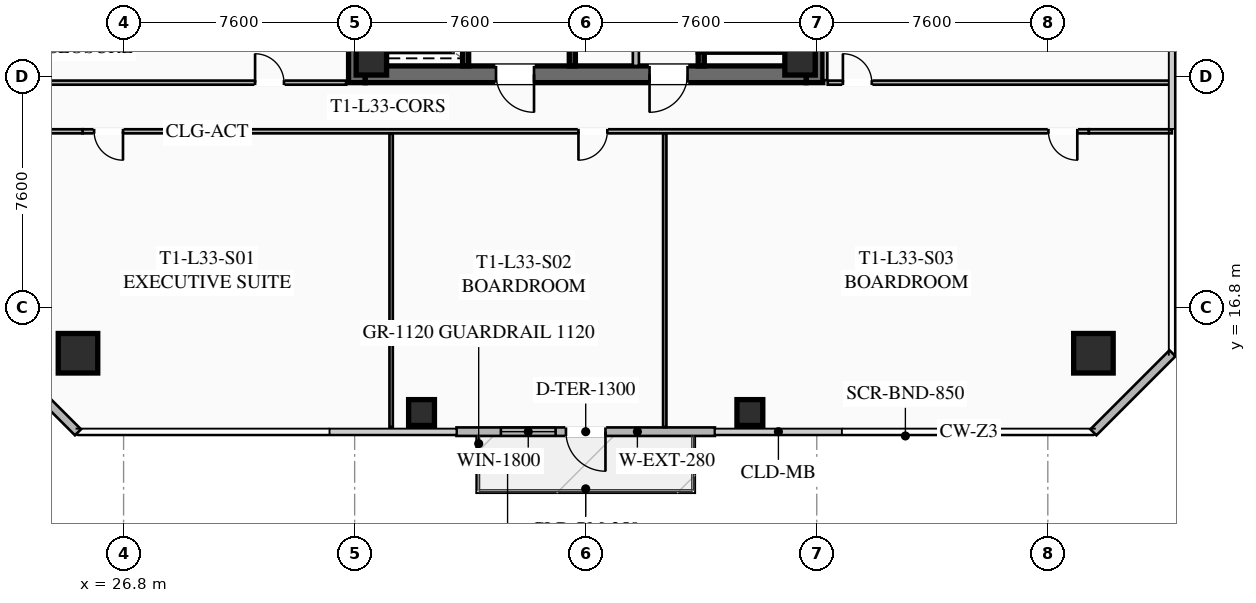
"""IFC4 building model, lengths in metres.
Left out: names, types, materials, properties, quantities, classifications, styles, units other than length and angle.
Written with IfcOpenShell. Run it as: python <this file> out.ifc"""

import sys

from ifc_helpers import new_model, si_unit, direction, frame, frame_2d, origin, origin_2d, place, context, subcontext, project, spatial, rectangle, hollow_rectangle, extrude, element, fill, save


model = new_model("IFC4")
c1 = context("Model", 3, precision=1e-05, world=origin(), true_north=direction((0.0, 1.0)))
c2 = subcontext(c1, "Body", "Model", "MODEL_VIEW")
j1 = project(units=[si_unit("LENGTHUNIT", "METRE"), si_unit("PLANEANGLEUNIT", "RADIAN")], contexts=[c1])
p1 = place(None, origin())
s1 = spatial("IfcSite", under=j1, at=p1, CompositionType="ELEMENT")
p2 = place(p1, origin())
s2 = spatial("IfcBuilding", under=s1, at=p2, CompositionType="ELEMENT")
p3 = place(p2, frame((0.0, 0.0, 125.05)))
s3 = spatial("IfcBuildingStorey", under=s2, at=p3, CompositionType="ELEMENT", Elevation=125.05)
for number, where, z_axis, x_axis in (
    (1, (34.475, 24.2, 0.0), (0.0, 0.0, 1.0), (0.0, 1.0, 0.0)),
    (2, (49.525, 39.8, 0.0), (0.0, 0.0, 1.0), (0.0, -1.0, 0.0)),
):
    element("IfcWall", number, at=place(p3, frame(where, z_axis=z_axis, x_axis=x_axis)), inside=s3, PredefinedType="SHEAR", context=c2, shape_type="SweptSolid", body=[
        extrude(rectangle(XDim=15.6, YDim=0.55, at=frame_2d((7.8, 0.0))), origin(), (0.0, 0.0, 1.0), 3.55),
    ])
p4 = place(p3, frame((49.25, 24.475, 0.0), z_axis=(0.0, 0.0, 1.0), x_axis=(-1.0, 0.0, 0.0)))
e3 = element("IfcWall", 3, at=p4, inside=s3, PredefinedType="SHEAR", context=c2, shape_type="SweptSolid", body=[
    extrude(rectangle(XDim=14.5, YDim=0.55, at=frame_2d((7.25, 0.0))), origin(), (0.0, 0.0, 1.0), 3.55),
])
p5 = place(p4, frame((8.95, 0.0, 0.0)))
e4 = element("IfcOpeningElement", 4, at=p5, cuts=e3, PredefinedType="OPENING", context=c2, shape_type="SweptSolid", body=[
    extrude(rectangle(XDim=1.25, YDim=2.25, at=frame_2d((0.625, 1.125))), frame((0.0, 0.285, 0.0), z_axis=(0.0, -1.0, 0.0), x_axis=(1.0, 0.0, 0.0)), (0.0, 0.0, 1.0), 0.57),
])
p6 = place(p4, frame((3.9, 0.0, 0.0)))
e5 = element("IfcOpeningElement", 5, at=p6, cuts=e3, PredefinedType="OPENING", context=c2, shape_type="SweptSolid", body=[
    extrude(rectangle(XDim=1.25, YDim=2.25, at=frame_2d((0.625, 1.125))), frame((0.0, 0.285, 0.0), z_axis=(0.0, -1.0, 0.0), x_axis=(1.0, 0.0, 0.0)), (0.0, 0.0, 1.0), 0.57),
])
for number, where, z_axis, x_axis in (
    (6, (34.95, 24.95, 0.0), (0.0, 0.0, 1.0), (1.0, 0.0, 0.0)),
    (7, (49.05, 24.95, 0.0), (0.0, 0.0, 1.0), (1.0, 0.0, 0.0)),
):
    element("IfcColumn", number, at=place(p3, frame(where, z_axis=z_axis, x_axis=x_axis)), inside=s3, PredefinedType="COLUMN", context=c2, shape_type="SweptSolid", body=[
        extrude(hollow_rectangle(XDim=1.0, YDim=1.0, WallThickness=0.04, at=origin_2d()), origin(), (0.0, 0.0, 1.0), 3.37),
    ])
for number, where, z_axis, x_axis in (
    (8, (25.3, 15.3, 0.0), (0.0, 0.0, 1.0), (1.0, 0.0, 0.0)),
    (9, (58.7, 15.3, 0.0), (0.0, 0.0, 1.0), (1.0, 0.0, 0.0)),
):
    element("IfcColumn", number, at=place(p3, frame(where, z_axis=z_axis, x_axis=x_axis)), inside=s3, PredefinedType="COLUMN", context=c2, shape_type="SweptSolid", body=[
        extrude(hollow_rectangle(XDim=1.3, YDim=1.3, WallThickness=0.05, at=origin_2d()), origin(), (0.0, 0.0, 1.0), 3.37),
    ])
for number, where, z_axis, x_axis in (
    (10, (36.6, 13.35, 0.0), (0.0, 0.0, 1.0), (1.0, 0.0, 0.0)),
    (11, (47.4, 13.35, 0.0), (0.0, 0.0, 1.0), (1.0, 0.0, 0.0)),
):
    element("IfcColumn", number, at=place(p3, frame(where, z_axis=z_axis, x_axis=x_axis)), inside=s3, PredefinedType="COLUMN", context=c2, shape_type="SweptSolid", body=[
        extrude(hollow_rectangle(XDim=0.85, YDim=0.85, WallThickness=0.035, at=origin_2d()), origin(), (0.0, 0.0, 1.0), 3.37),
    ])
p7 = place(p3, frame((46.25, 12.72, 0.0), z_axis=(0.0, 0.0, 1.0), x_axis=(-1.0, 0.0, 0.0)))
e12 = element("IfcWall", 12, at=p7, inside=s3, PredefinedType="SOLIDWALL", context=c2, shape_type="SweptSolid", body=[
    extrude(rectangle(XDim=8.5, YDim=0.28, at=frame_2d((4.25, 0.0))), origin(), (0.0, 0.0, 1.0), 3.37),
])
p8 = place(p7, frame((3.6, 0.0, 0.0)))
e13 = element("IfcOpeningElement", 13, at=p8, cuts=e12, PredefinedType="OPENING", context=c2, shape_type="SweptSolid", body=[
    extrude(rectangle(XDim=1.3, YDim=2.15, at=frame_2d((0.65, 1.075))), frame((0.0, 0.15, 0.0), z_axis=(0.0, -1.0, 0.0), x_axis=(1.0, 0.0, 0.0)), (0.0, 0.0, 1.0), 0.3),
])
p9 = place(p7, frame((5.24, 0.0, 0.85)))
e14 = element("IfcOpeningElement", 14, at=p9, cuts=e12, PredefinedType="OPENING", context=c2, shape_type="SweptSolid", body=[
    extrude(rectangle(XDim=1.8, YDim=1.92, at=frame_2d((0.9, 0.96))), frame((0.0, 0.15, 0.0), z_axis=(0.0, -1.0, 0.0), x_axis=(1.0, 0.0, 0.0)), (0.0, 0.0, 1.0), 0.3),
])
for number, where, z_axis, x_axis in (
    (15, (25.3, 12.7, 0.0), (0.0, 0.0, 1.0), (-0.707, 0.707, 0.0)),
    (16, (61.3, 15.3, 0.0), (0.0, 0.0, 1.0), (-0.707, -0.707, 0.0)),
):
    element("IfcWall", number, at=place(p3, frame(where, z_axis=z_axis, x_axis=x_axis)), inside=s3, PredefinedType="SOLIDWALL", context=c2, shape_type="SweptSolid", body=[
        extrude(rectangle(XDim=3.677, YDim=0.28, at=frame_2d((1.838, 0.0))), origin(), (0.0, 0.0, 1.0), 3.37),
    ])
p10 = place(p3, frame((45.8, 32.8, 0.0), z_axis=(0.0, 0.0, 1.0), x_axis=(0.0, -1.0, 0.0)))
e17 = element("IfcWall", 17, at=p10, inside=s3, PredefinedType="SHEAR", context=c2, shape_type="SweptSolid", body=[
    extrude(rectangle(XDim=8.05, YDim=0.2, at=frame_2d((4.025, 0.0))), origin(), (0.0, 0.0, 1.0), 3.37),
])
p11 = place(p10, frame((0.45, 0.0, 0.0)))
e18 = element("IfcOpeningElement", 18, at=p11, cuts=e17, PredefinedType="OPENING", context=c2, shape_type="SweptSolid", body=[
    extrude(rectangle(XDim=1.15, YDim=2.2, at=frame_2d((0.575, 1.1))), frame((0.0, 0.11, 0.0), z_axis=(0.0, -1.0, 0.0), x_axis=(1.0, 0.0, 0.0)), (0.0, 0.0, 1.0), 0.22),
])
p12 = place(p3, frame((41.56, 24.75, 0.0), z_axis=(0.0, 0.0, 1.0), x_axis=(0.0, 1.0, 0.0)))
e19 = element("IfcWall", 19, at=p12, inside=s3, PredefinedType="SHEAR", context=c2, shape_type="SweptSolid", body=[
    extrude(rectangle(XDim=14.5, YDim=0.2, at=frame_2d((7.25, 0.0))), origin(), (0.0, 0.0, 1.0), 3.37),
])
p13 = place(p3, frame((38.05, 24.75, 0.0), z_axis=(0.0, 0.0, 1.0), x_axis=(0.0, 1.0, 0.0)))
e20 = element("IfcWall", 20, at=p13, inside=s3, PredefinedType="SHEAR", context=c2, shape_type="SweptSolid", body=[
    extrude(rectangle(XDim=6.45, YDim=0.2, at=frame_2d((3.225, 0.0))), origin(), (0.0, 0.0, 1.0), 3.37),
])
p14 = place(p13, frame((4.875, 0.0, 0.0)))
e21 = element("IfcOpeningElement", 21, at=p14, cuts=e20, PredefinedType="OPENING", context=c2, shape_type="SweptSolid", body=[
    extrude(rectangle(XDim=1.3, YDim=2.25, at=frame_2d((0.65, 1.125))), frame((0.0, 0.11, 0.0), z_axis=(0.0, -1.0, 0.0), x_axis=(1.0, 0.0, 0.0)), (0.0, 0.0, 1.0), 0.22),
])
p15 = place(p13, frame((2.875, 0.0, 0.0)))
e22 = element("IfcOpeningElement", 22, at=p15, cuts=e20, PredefinedType="OPENING", context=c2, shape_type="SweptSolid", body=[
    extrude(rectangle(XDim=1.3, YDim=2.25, at=frame_2d((0.65, 1.125))), frame((0.0, 0.11, 0.0), z_axis=(0.0, -1.0, 0.0), x_axis=(1.0, 0.0, 0.0)), (0.0, 0.0, 1.0), 0.22),
])
p16 = place(p13, frame((0.675, 0.0, 0.0)))
e23 = element("IfcOpeningElement", 23, at=p16, cuts=e20, PredefinedType="OPENING", context=c2, shape_type="SweptSolid", body=[
    extrude(rectangle(XDim=1.3, YDim=2.25, at=frame_2d((0.65, 1.125))), frame((0.0, 0.11, 0.0), z_axis=(0.0, -1.0, 0.0), x_axis=(1.0, 0.0, 0.0)), (0.0, 0.0, 1.0), 0.22),
])
p17 = place(p3, frame((43.65, 24.75, 0.0), z_axis=(0.0, 0.0, 1.0), x_axis=(0.0, 1.0, 0.0)))
e24 = element("IfcWall", 24, at=p17, inside=s3, PredefinedType="SOLIDWALL", context=c2, shape_type="SweptSolid", body=[
    extrude(rectangle(XDim=6.9, YDim=0.2, at=frame_2d((3.45, 0.0))), origin(), (0.0, 0.0, 1.0), 2.723),
])
p18 = place(p17, frame((0.85, 0.0, 0.0)))
e25 = element("IfcOpeningElement", 25, at=p18, cuts=e24, PredefinedType="OPENING", context=c2, shape_type="SweptSolid", body=[
    extrude(rectangle(XDim=0.95, YDim=2.05, at=frame_2d((0.475, 1.025))), frame((0.0, 0.11, 0.0), z_axis=(0.0, -1.0, 0.0), x_axis=(1.0, 0.0, 0.0)), (0.0, 0.0, 1.0), 0.22),
])
p19 = place(p17, frame((4.8, 0.0, 0.0)))
e26 = element("IfcOpeningElement", 26, at=p19, cuts=e24, PredefinedType="OPENING", context=c2, shape_type="SweptSolid", body=[
    extrude(rectangle(XDim=1.05, YDim=2.2, at=frame_2d((0.525, 1.1))), frame((0.0, 0.11, 0.0), z_axis=(0.0, -1.0, 0.0), x_axis=(1.0, 0.0, 0.0)), (0.0, 0.0, 1.0), 0.22),
])
p20 = place(p3, frame((58.55, 22.6, 0.0), z_axis=(0.0, 0.0, 1.0), x_axis=(-1.0, 0.0, 0.0)))
e27 = element("IfcWall", 27, at=p20, inside=s3, PredefinedType="PARTITIONING", context=c2, shape_type="SweptSolid", body=[
    extrude(rectangle(XDim=33.1, YDim=0.135, at=frame_2d((16.55, 0.0))), origin(), (0.0, 0.0, 1.0), 2.723),
])
p21 = place(p20, frame((31.77, 0.0, 0.0)))
e28 = element("IfcOpeningElement", 28, at=p21, cuts=e27, PredefinedType="OPENING", context=c2, shape_type="SweptSolid", body=[
    extrude(rectangle(XDim=0.95, YDim=2.05, at=frame_2d((0.475, 1.025))), frame((0.0, 0.077, 0.0), z_axis=(0.0, -1.0, 0.0), x_axis=(1.0, 0.0, 0.0)), (0.0, 0.0, 1.0), 0.155),
])
p22 = place(p20, frame((15.838, 0.0, 0.0)))
e29 = element("IfcOpeningElement", 29, at=p22, cuts=e27, PredefinedType="OPENING", context=c2, shape_type="SweptSolid", body=[
    extrude(rectangle(XDim=0.95, YDim=2.05, at=frame_2d((0.475, 1.025))), frame((0.0, 0.077, 0.0), z_axis=(0.0, -1.0, 0.0), x_axis=(1.0, 0.0, 0.0)), (0.0, 0.0, 1.0), 0.155),
])
p23 = place(p20, frame((0.38, 0.0, 0.0)))
e30 = element("IfcOpeningElement", 30, at=p23, cuts=e27, PredefinedType="OPENING", context=c2, shape_type="SweptSolid", body=[
    extrude(rectangle(XDim=0.95, YDim=2.05, at=frame_2d((0.475, 1.025))), frame((0.0, 0.077, 0.0), z_axis=(0.0, -1.0, 0.0), x_axis=(1.0, 0.0, 0.0)), (0.0, 0.0, 1.0), 0.155),
])
for number, where, z_axis, x_axis in (
    (31, (22.72, 22.6, 0.0), (0.0, 0.0, 1.0), (1.0, 0.0, 0.0)),
    (32, (58.55, 22.6, 0.0), (0.0, 0.0, 1.0), (1.0, 0.0, 0.0)),
):
    element("IfcWall", number, at=place(p3, frame(where, z_axis=z_axis, x_axis=x_axis)), inside=s3, PredefinedType="PARTITIONING", context=c2, shape_type="SweptSolid", body=[
        extrude(rectangle(XDim=2.73, YDim=0.135, at=frame_2d((1.365, 0.0))), origin(), (0.0, 0.0, 1.0), 2.723),
    ])
for number, where, z_axis, x_axis in (
    (33, (35.6, 12.87, 0.0), (0.0, 0.0, 1.0), (0.0, 1.0, 0.0)),
    (34, (44.6, 12.87, 0.0), (0.0, 0.0, 1.0), (0.0, 1.0, 0.0)),
):
    element("IfcWall", number, at=place(p3, frame(where, z_axis=z_axis, x_axis=x_axis)), inside=s3, PredefinedType="PARTITIONING", context=c2, shape_type="SweptSolid", body=[
        extrude(rectangle(XDim=9.65, YDim=0.11, at=frame_2d((4.825, 0.0))), origin(), (0.0, 0.0, 1.0), 2.723),
    ])
p24 = place(p3, frame((49.88, 39.72, 0.0), z_axis=(0.0, 0.0, 1.0), x_axis=(0.0, -1.0, 0.0)))
e35 = element("IfcWall", 35, at=p24, inside=s3, PredefinedType="PARTITIONING", context=c2, shape_type="SweptSolid", body=[
    extrude(rectangle(XDim=15.44, YDim=0.135, at=frame_2d((7.72, 0.0))), origin(), (0.0, 0.0, 1.0), 2.723),
])
p25 = place(p3, frame((49.96, 24.2, 0.0), z_axis=(0.0, 0.0, 1.0), x_axis=(1.0, 0.0, 0.0)))
e36 = element("IfcWall", 36, at=p25, inside=s3, PredefinedType="PARTITIONING", context=c2, shape_type="SweptSolid", body=[
    extrude(rectangle(XDim=11.32, YDim=0.135, at=frame_2d((5.66, 0.0))), origin(), (0.0, 0.0, 1.0), 2.723),
])
p26 = place(p25, frame((0.5, 0.0, 0.0)))
e37 = element("IfcOpeningElement", 37, at=p26, cuts=e36, PredefinedType="OPENING", context=c2, shape_type="SweptSolid", body=[
    extrude(rectangle(XDim=0.95, YDim=2.05, at=frame_2d((0.475, 1.025))), frame((0.0, 0.077, 0.0), z_axis=(0.0, -1.0, 0.0), x_axis=(1.0, 0.0, 0.0)), (0.0, 0.0, 1.0), 0.155),
])
p27 = place(p3, frame((22.72, 24.2, 0.0), z_axis=(0.0, 0.0, 1.0), x_axis=(1.0, 0.0, 0.0)))
e38 = element("IfcWall", 38, at=p27, inside=s3, PredefinedType="PARTITIONING", context=c2, shape_type="SweptSolid", body=[
    extrude(rectangle(XDim=11.4, YDim=0.135, at=frame_2d((5.7, 0.0))), origin(), (0.0, 0.0, 1.0), 2.723),
])
p28 = place(p27, frame((8.405, 0.0, 0.0)))
e39 = element("IfcOpeningElement", 39, at=p28, cuts=e38, PredefinedType="OPENING", context=c2, shape_type="SweptSolid", body=[
    extrude(rectangle(XDim=0.95, YDim=2.05, at=frame_2d((0.475, 1.025))), frame((0.0, 0.077, 0.0), z_axis=(0.0, -1.0, 0.0), x_axis=(1.0, 0.0, 0.0)), (0.0, 0.0, 1.0), 0.155),
])
p29 = place(p8, origin())
e40 = element("IfcDoor", 40, at=p29, inside=s3, OperationType="SINGLE_SWING_LEFT", PredefinedType="DOOR", context=c2, shape_type="SweptSolid", body=[
    extrude(rectangle(XDim=1.3, YDim=2.15, at=frame_2d((0.65, 1.075))), frame((0.0, 0.025, 0.0), z_axis=(0.0, -1.0, 0.0), x_axis=(1.0, 0.0, 0.0)), (0.0, 0.0, 1.0), 0.05),
])
fill(e13, e40)
p30 = place(p9, origin())
e41 = element("IfcWindow", 41, at=p30, inside=s3, PartitioningType="SINGLE_PANEL", PredefinedType="WINDOW", context=c2, shape_type="SweptSolid", body=[
    extrude(rectangle(XDim=1.8, YDim=1.92, at=frame_2d((0.9, 0.96))), frame((0.0, 0.03, 0.0), z_axis=(0.0, -1.0, 0.0), x_axis=(1.0, 0.0, 0.0)), (0.0, 0.0, 1.0), 0.06),
])
fill(e14, e41)
p31 = place(p5, origin())
e42 = element("IfcDoor", 42, at=p31, inside=s3, OperationType="SINGLE_SWING_LEFT", PredefinedType="DOOR", context=c2, shape_type="SweptSolid", body=[
    extrude(rectangle(XDim=1.25, YDim=2.25, at=frame_2d((0.625, 1.125))), frame((0.0, 0.025, 0.0), z_axis=(0.0, -1.0, 0.0), x_axis=(1.0, 0.0, 0.0)), (0.0, 0.0, 1.0), 0.05),
])
fill(e4, e42)
p32 = place(p6, origin())
e43 = element("IfcDoor", 43, at=p32, inside=s3, OperationType="SINGLE_SWING_RIGHT", PredefinedType="DOOR", context=c2, shape_type="SweptSolid", body=[
    extrude(rectangle(XDim=1.25, YDim=2.25, at=frame_2d((0.625, 1.125))), frame((0.0, 0.025, 0.0), z_axis=(0.0, -1.0, 0.0), x_axis=(1.0, 0.0, 0.0)), (0.0, 0.0, 1.0), 0.05),
])
fill(e5, e43)
p33 = place(p21, origin())
e44 = element("IfcDoor", 44, at=p33, inside=s3, OperationType="SINGLE_SWING_LEFT", PredefinedType="DOOR", context=c2, shape_type="SweptSolid", body=[
    extrude(rectangle(XDim=0.95, YDim=2.05, at=frame_2d((0.475, 1.025))), frame((0.0, 0.025, 0.0), z_axis=(0.0, -1.0, 0.0), x_axis=(1.0, 0.0, 0.0)), (0.0, 0.0, 1.0), 0.05),
])
fill(e28, e44)
p34 = place(p22, origin())
e45 = element("IfcDoor", 45, at=p34, inside=s3, OperationType="SINGLE_SWING_RIGHT", PredefinedType="DOOR", context=c2, shape_type="SweptSolid", body=[
    extrude(rectangle(XDim=0.95, YDim=2.05, at=frame_2d((0.475, 1.025))), frame((0.0, 0.025, 0.0), z_axis=(0.0, -1.0, 0.0), x_axis=(1.0, 0.0, 0.0)), (0.0, 0.0, 1.0), 0.05),
])
fill(e29, e45)
p35 = place(p23, origin())
e46 = element("IfcDoor", 46, at=p35, inside=s3, OperationType="SINGLE_SWING_LEFT", PredefinedType="DOOR", context=c2, shape_type="SweptSolid", body=[
    extrude(rectangle(XDim=0.95, YDim=2.05, at=frame_2d((0.475, 1.025))), frame((0.0, 0.025, 0.0), z_axis=(0.0, -1.0, 0.0), x_axis=(1.0, 0.0, 0.0)), (0.0, 0.0, 1.0), 0.05),
])
fill(e30, e46)
p36 = place(p26, origin())
e47 = element("IfcDoor", 47, at=p36, inside=s3, OperationType="SINGLE_SWING_LEFT", PredefinedType="DOOR", context=c2, shape_type="SweptSolid", body=[
    extrude(rectangle(XDim=0.95, YDim=2.05, at=frame_2d((0.475, 1.025))), frame((0.0, 0.025, 0.0), z_axis=(0.0, -1.0, 0.0), x_axis=(1.0, 0.0, 0.0)), (0.0, 0.0, 1.0), 0.05),
])
fill(e37, e47)
p37 = place(p28, origin())
e48 = element("IfcDoor", 48, at=p37, inside=s3, OperationType="SINGLE_SWING_LEFT", PredefinedType="DOOR", context=c2, shape_type="SweptSolid", body=[
    extrude(rectangle(XDim=0.95, YDim=2.05, at=frame_2d((0.475, 1.025))), frame((0.0, 0.025, 0.0), z_axis=(0.0, -1.0, 0.0), x_axis=(1.0, 0.0, 0.0)), (0.0, 0.0, 1.0), 0.05),
])
fill(e39, e48)
save(model, sys.argv[1])
